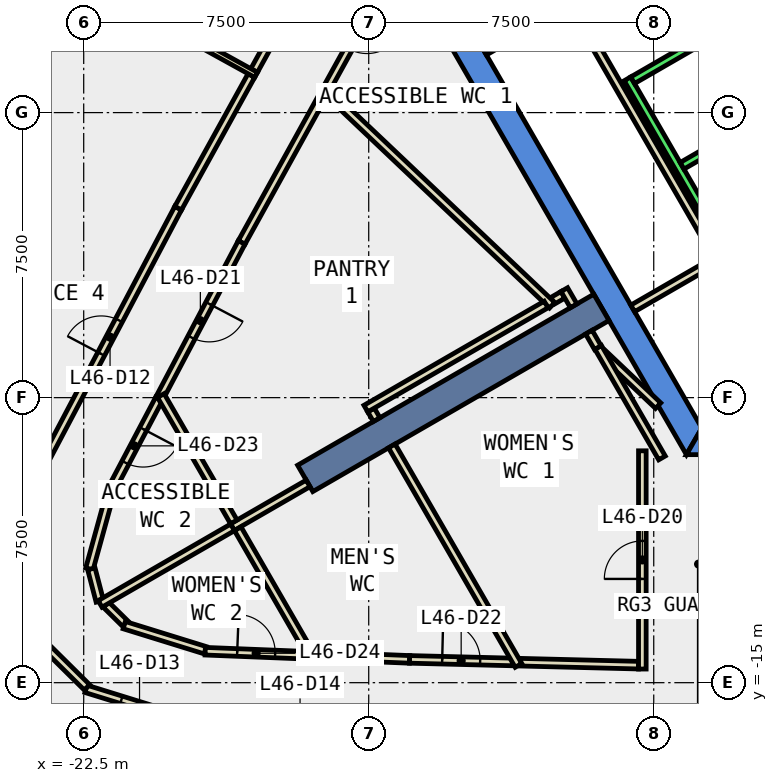
"""IFC4 building model, lengths in metres.
Left out: names, types, materials, properties, quantities, classifications, styles, units other than length and angle.
Written with IfcOpenShell. Run it as: python <this file> out.ifc"""

import sys

from ifc_helpers import new_model, si_unit, direction, frame, frame_2d, origin, place, context, subcontext, project, spatial, polyline, rectangle, outline, extrude, element, fill, save


model = new_model("IFC4")
c1 = context("Model", 3, precision=1e-05, world=origin(), true_north=direction((0.0, 1.0)))
c2 = subcontext(c1, "Body", "Model", "MODEL_VIEW")
j1 = project(units=[si_unit("LENGTHUNIT", "METRE"), si_unit("PLANEANGLEUNIT", "RADIAN")], contexts=[c1])
p1 = place(None, origin())
s1 = spatial("IfcSite", under=j1, at=p1, CompositionType="ELEMENT")
p2 = place(p1, origin())
s2 = spatial("IfcBuilding", under=s1, at=p2, CompositionType="ELEMENT")
p3 = place(p2, frame((0.0, 0.0, 206.6)))
s3 = spatial("IfcBuildingStorey", under=s2, at=p3, CompositionType="ELEMENT", Elevation=206.6)
p4 = place(p3, frame((0.0, 0.0, -0.4)))
e1 = element("IfcWall", 1, at=p4, inside=s3, PredefinedType="SHEAR", context=c2, shape_type="SweptSolid", body=[
    extrude(outline(polyline([(-13.279, 2.5), (-6.64, -9.0), (-6.235, -8.3), (-12.471, 2.5), (-13.279, 2.5)])), origin(), (0.0, 0.0, 1.0), 4.2),
])
p5 = place(p3, frame((0.0, 0.0, -0.4)))
e2 = element("IfcWall", 2, at=p5, inside=s3, PredefinedType="SHEAR", context=c2, shape_type="SweptSolid", body=[
    extrude(outline(polyline([(3.75, -9.0), (3.75, -8.3), (-6.235, -8.3), (-6.64, -9.0), (3.75, -9.0)])), origin(), (0.0, 0.0, 1.0), 4.2),
])
p6 = place(p3, frame((-8.877, -5.125, -0.4), z_axis=(0.0, 0.0, 1.0), x_axis=(-0.866017533419, -0.500013631625, 0.0)))
e3 = element("IfcWall", 3, at=p6, inside=s3, PredefinedType="SHEAR", context=c2, shape_type="SweptSolid", body=[
    extrude(rectangle(XDim=9.0, YDim=0.8, at=frame_2d((4.5, 0.0))), origin(), (0.0, 0.0, 1.0), 4.2),
])
p7 = place(p3, frame((-21.51, 7.086, 0.0), z_axis=(0.0, 0.0, 1.0), x_axis=(-0.483590905878, -0.875294142419, 0.0)))
e4 = element("IfcWall", 4, at=p7, inside=s3, PredefinedType="STANDARD", context=c2, shape_type="SweptSolid", body=[
    extrude(rectangle(XDim=7.238, YDim=0.3, at=frame_2d((3.619, 0.0))), origin(), (0.0, 0.0, 1.0), 3.8),
])
p8 = place(p7, frame((0.609, 0.0, 0.9)))
e5 = element("IfcOpeningElement", 5, at=p8, cuts=e4, PredefinedType="OPENING", context=c2, shape_type="SweptSolid", body=[
    extrude(rectangle(XDim=2.4, YDim=2.6, at=frame_2d((1.2, 1.3))), frame((0.0, 0.16, 0.0), z_axis=(0.0, -1.0, 0.0), x_axis=(1.0, 0.0, 0.0)), (0.0, 0.0, 1.0), 0.32),
])
p9 = place(p7, frame((4.228, 0.0, 0.9)))
e6 = element("IfcOpeningElement", 6, at=p9, cuts=e4, PredefinedType="OPENING", context=c2, shape_type="SweptSolid", body=[
    extrude(rectangle(XDim=2.4, YDim=2.6, at=frame_2d((1.2, 1.3))), frame((0.0, 0.16, 0.0), z_axis=(0.0, -1.0, 0.0), x_axis=(1.0, 0.0, 0.0)), (0.0, 0.0, 1.0), 0.32),
])
p10 = place(p3, frame((-14.487, 3.564, 0.0), z_axis=(0.0, 0.0, 1.0), x_axis=(-0.483555199903, -0.875313868648, 0.0)))
e7 = element("IfcWall", 7, at=p10, inside=s3, PredefinedType="PARTITIONING", context=c2, shape_type="SweptSolid", body=[
    extrude(rectangle(XDim=3.309, YDim=0.2, at=frame_2d((1.654, 0.0))), origin(), (0.0, 0.0, 1.0), 3.8),
])
p11 = place(p10, frame((1.154, 0.0, 0.0)))
e8 = element("IfcOpeningElement", 8, at=p11, cuts=e7, PredefinedType="OPENING", context=c2, shape_type="SweptSolid", body=[
    extrude(rectangle(XDim=1.0, YDim=2.1, at=frame_2d((0.5, 1.05))), frame((0.0, 0.11, 0.0), z_axis=(0.0, -1.0, 0.0), x_axis=(1.0, 0.0, 0.0)), (0.0, 0.0, 1.0), 0.22),
])
p12 = place(p3, frame((-11.009, -14.461, 0.0), z_axis=(0.0, 0.0, 1.0), x_axis=(0.999684451251, -0.025119672116, 0.0)))
e9 = element("IfcWall", 9, at=p12, inside=s3, PredefinedType="PARTITIONING", context=c2, shape_type="SweptSolid", body=[
    extrude(rectangle(XDim=3.11, YDim=0.2, at=frame_2d((1.555, 0.0))), origin(), (0.0, 0.0, 1.0), 3.8),
])
p13 = place(p3, frame((-16.184, 0.493, 0.0), z_axis=(0.0, 0.0, 1.0), x_axis=(-0.48354397003, -0.875320072344, 0.0)))
e10 = element("IfcWall", 10, at=p13, inside=s3, PredefinedType="PARTITIONING", context=c2, shape_type="SweptSolid", body=[
    extrude(rectangle(XDim=4.467, YDim=0.2, at=frame_2d((2.233, 0.0))), origin(), (0.0, 0.0, 1.0), 3.8),
])
p14 = place(p3, frame((-18.344, -3.417, 0.0), z_axis=(0.0, 0.0, 1.0), x_axis=(-0.466889669343, -0.884315575267, 0.0)))
e11 = element("IfcWall", 11, at=p14, inside=s3, PredefinedType="PARTITIONING", context=c2, shape_type="SweptSolid", body=[
    extrude(rectangle(XDim=4.654, YDim=0.2, at=frame_2d((2.327, 0.0))), origin(), (0.0, 0.0, 1.0), 3.8),
])
p15 = place(p14, frame((1.827, 0.0, 0.0)))
e12 = element("IfcOpeningElement", 12, at=p15, cuts=e11, PredefinedType="OPENING", context=c2, shape_type="SweptSolid", body=[
    extrude(rectangle(XDim=1.0, YDim=2.1, at=frame_2d((0.5, 1.05))), frame((0.0, 0.11, 0.0), z_axis=(0.0, -1.0, 0.0), x_axis=(1.0, 0.0, 0.0)), (0.0, 0.0, 1.0), 0.22),
])
p16 = place(p3, frame((-16.422, -14.287, 0.0), z_axis=(0.0, 0.0, 1.0), x_axis=(0.999201426829, -0.039956333943, 0.0)))
e13 = element("IfcWall", 13, at=p16, inside=s3, PredefinedType="PARTITIONING", context=c2, shape_type="SweptSolid", body=[
    extrude(rectangle(XDim=2.499, YDim=0.2, at=frame_2d((1.25, 0.0))), origin(), (0.0, 0.0, 1.0), 3.8),
])
p17 = place(p3, frame((-13.925, -14.387, 0.0), z_axis=(0.0, 0.0, 1.0), x_axis=(0.999685678874, -0.025070768935, 0.0)))
e14 = element("IfcWall", 14, at=p17, inside=s3, PredefinedType="PARTITIONING", context=c2, shape_type="SweptSolid", body=[
    extrude(rectangle(XDim=2.717, YDim=0.2, at=frame_2d((1.358, 0.0))), origin(), (0.0, 0.0, 1.0), 3.8),
])
p18 = place(p17, frame((0.858, 0.0, 0.0)))
e15 = element("IfcOpeningElement", 15, at=p18, cuts=e14, PredefinedType="OPENING", context=c2, shape_type="SweptSolid", body=[
    extrude(rectangle(XDim=1.0, YDim=2.1, at=frame_2d((0.5, 1.05))), frame((0.0, 0.11, 0.0), z_axis=(0.0, -1.0, 0.0), x_axis=(1.0, 0.0, 0.0)), (0.0, 0.0, 1.0), 0.22),
])
p19 = place(p3, frame((-20.517, -7.533, 0.0), z_axis=(0.0, 0.0, 1.0), x_axis=(-0.466570716246, -0.88448389852, 0.0)))
e16 = element("IfcWall", 16, at=p19, inside=s3, PredefinedType="PARTITIONING", context=c2, shape_type="SweptSolid", body=[
    extrude(rectangle(XDim=2.795, YDim=0.2, at=frame_2d((1.397, 0.0))), origin(), (0.0, 0.0, 1.0), 3.8),
])
p20 = place(p19, frame((0.897, 0.0, 0.0)))
e17 = element("IfcOpeningElement", 17, at=p20, cuts=e16, PredefinedType="OPENING", context=c2, shape_type="SweptSolid", body=[
    extrude(rectangle(XDim=1.0, YDim=2.1, at=frame_2d((0.5, 1.05))), frame((0.0, 0.11, 0.0), z_axis=(0.0, -1.0, 0.0), x_axis=(1.0, 0.0, 0.0)), (0.0, 0.0, 1.0), 0.22),
])
p21 = place(p3, frame((-21.801, -10.013, 0.0), z_axis=(0.0, 0.0, 1.0), x_axis=(-0.265584627827, -0.964087550725, 0.0)))
e18 = element("IfcWall", 18, at=p21, inside=s3, PredefinedType="PARTITIONING", context=c2, shape_type="SweptSolid", body=[
    extrude(rectangle(XDim=2.067, YDim=0.2, at=frame_2d((1.034, 0.0))), origin(), (0.0, 0.0, 1.0), 3.8),
])
p22 = place(p3, frame((-22.298, -12.006, 0.0), z_axis=(0.0, 0.0, 1.0), x_axis=(0.252647929446, -0.967558279251, 0.0)))
e19 = element("IfcWall", 19, at=p22, inside=s3, PredefinedType="PARTITIONING", context=c2, shape_type="SweptSolid", body=[
    extrude(rectangle(XDim=0.879, YDim=0.2, at=frame_2d((0.44, 0.0))), origin(), (0.0, 0.0, 1.0), 3.8),
])
p23 = place(p3, frame((-21.912, -12.948, 0.0), z_axis=(0.0, 0.0, 1.0), x_axis=(0.712089244685, -0.702088959893, 0.0)))
e20 = element("IfcWall", 20, at=p23, inside=s3, PredefinedType="PARTITIONING", context=c2, shape_type="SweptSolid", body=[
    extrude(rectangle(XDim=0.708, YDim=0.2, at=frame_2d((0.354, 0.0))), origin(), (0.0, 0.0, 1.0), 3.8),
])
p24 = place(p3, frame((-21.433, -13.486, 0.0), z_axis=(0.0, 0.0, 1.0), x_axis=(0.955241047187, -0.295828568211, 0.0)))
e21 = element("IfcWall", 21, at=p24, inside=s3, PredefinedType="PARTITIONING", context=c2, shape_type="SweptSolid", body=[
    extrude(rectangle(XDim=2.234, YDim=0.2, at=frame_2d((1.117, 0.0))), origin(), (0.0, 0.0, 1.0), 3.8),
])
p25 = place(p3, frame((-19.303, -14.172, 0.0), z_axis=(0.0, 0.0, 1.0), x_axis=(0.999205458466, -0.03985538574, 0.0)))
e22 = element("IfcWall", 22, at=p25, inside=s3, PredefinedType="PARTITIONING", context=c2, shape_type="SweptSolid", body=[
    extrude(rectangle(XDim=2.683, YDim=0.2, at=frame_2d((1.342, 0.0))), origin(), (0.0, 0.0, 1.0), 3.8),
])
p26 = place(p25, frame((0.842, 0.0, 0.0)))
e23 = element("IfcOpeningElement", 23, at=p26, cuts=e22, PredefinedType="OPENING", context=c2, shape_type="SweptSolid", body=[
    extrude(rectangle(XDim=1.0, YDim=2.1, at=frame_2d((0.5, 1.05))), frame((0.0, 0.11, 0.0), z_axis=(0.0, -1.0, 0.0), x_axis=(1.0, 0.0, 0.0)), (0.0, 0.0, 1.0), 0.22),
])
p27 = place(p3, frame((-18.015, 1.107, 0.0), z_axis=(0.0, 0.0, 1.0), x_axis=(0.483551557311, 0.875315880938, 0.0)))
e24 = element("IfcWall", 24, at=p27, inside=s3, PredefinedType="PARTITIONING", context=c2, shape_type="SweptSolid", body=[
    extrude(rectangle(XDim=3.987, YDim=0.2, at=frame_2d((1.994, 0.0))), origin(), (0.0, 0.0, 1.0), 3.8),
])
p28 = place(p3, frame((-23.598, -9.301, 0.0), z_axis=(0.0, 0.0, 1.0), x_axis=(0.466852608943, 0.884335140952, 0.0)))
e25 = element("IfcWall", 25, at=p28, inside=s3, PredefinedType="PARTITIONING", context=c2, shape_type="SweptSolid", body=[
    extrude(rectangle(XDim=7.675, YDim=0.2, at=frame_2d((3.837, 0.0))), origin(), (0.0, 0.0, 1.0), 3.8),
])
p29 = place(p28, frame((3.337, 0.0, 0.0)))
e26 = element("IfcOpeningElement", 26, at=p29, cuts=e25, PredefinedType="OPENING", context=c2, shape_type="SweptSolid", body=[
    extrude(rectangle(XDim=1.0, YDim=2.1, at=frame_2d((0.5, 1.05))), frame((0.0, 0.11, 0.0), z_axis=(0.0, -1.0, 0.0), x_axis=(1.0, 0.0, 0.0)), (0.0, 0.0, 1.0), 0.22),
])
p30 = place(p3, frame((-20.015, -2.514, 0.0), z_axis=(0.0, 0.0, 1.0), x_axis=(0.483363864601, 0.875419541933, 0.0)))
e27 = element("IfcWall", 27, at=p30, inside=s3, PredefinedType="PARTITIONING", context=c2, shape_type="SweptSolid", body=[
    extrude(rectangle(XDim=3.987, YDim=0.2, at=frame_2d((1.993, 0.0))), origin(), (0.0, 0.0, 1.0), 3.8),
])
p31 = place(p3, frame((-19.623, -16.035, 0.0), z_axis=(0.0, 0.0, 1.0), x_axis=(-0.955234616163, 0.295849333419, 0.0)))
e28 = element("IfcWall", 28, at=p31, inside=s3, PredefinedType="PARTITIONING", context=c2, shape_type="SweptSolid", body=[
    extrude(rectangle(XDim=2.947, YDim=0.2, at=frame_2d((1.473, 0.0))), origin(), (0.0, 0.0, 1.0), 3.8),
])
p32 = place(p31, frame((0.974, 0.0, 0.0)))
e29 = element("IfcOpeningElement", 29, at=p32, cuts=e28, PredefinedType="OPENING", context=c2, shape_type="SweptSolid", body=[
    extrude(rectangle(XDim=1.0, YDim=2.1, at=frame_2d((0.5, 1.05))), frame((0.0, 0.11, 0.0), z_axis=(0.0, -1.0, 0.0), x_axis=(1.0, 0.0, 0.0)), (0.0, 0.0, 1.0), 0.22),
])
p33 = place(p3, frame((-22.414, -15.123, 0.0), z_axis=(0.0, 0.0, 1.0), x_axis=(-0.710949827962, 0.703242733429, 0.0)))
e30 = element("IfcWall", 30, at=p33, inside=s3, PredefinedType="PARTITIONING", context=c2, shape_type="SweptSolid", body=[
    extrude(rectangle(XDim=2.059, YDim=0.2, at=frame_2d((1.03, 0.0))), origin(), (0.0, 0.0, 1.0), 3.8),
])
p34 = place(p3, frame((-5.888, -3.902, 0.0), z_axis=(0.0, 0.0, 1.0), x_axis=(-0.866022959057, -0.500004234368, 0.0)))
e31 = element("IfcWall", 31, at=p34, inside=s3, PredefinedType="PARTITIONING", context=c2, shape_type="SweptSolid", body=[
    extrude(rectangle(XDim=2.5, YDim=0.2, at=frame_2d((1.25, 0.0))), origin(), (0.0, 0.0, 1.0), 3.8),
])
p35 = place(p3, frame((-11.953, 1.603, 0.0), z_axis=(0.0, 0.0, 1.0), x_axis=(0.865998541277, 0.500046524342, 0.0)))
e32 = element("IfcWall", 32, at=p35, inside=s3, PredefinedType="PARTITIONING", context=c2, shape_type="SweptSolid", body=[
    extrude(rectangle(XDim=2.5, YDim=0.2, at=frame_2d((1.25, 0.0))), origin(), (0.0, 0.0, 1.0), 3.8),
])
p36 = place(p35, frame((1.5, 0.0, 0.0)))
e33 = element("IfcOpeningElement", 33, at=p36, cuts=e32, PredefinedType="OPENING", context=c2, shape_type="SweptSolid", body=[
    extrude(rectangle(XDim=0.9, YDim=2.1, at=frame_2d((0.45, 1.05))), frame((0.0, 0.11, 0.0), z_axis=(0.0, -1.0, 0.0), x_axis=(1.0, 0.0, 0.0)), (0.0, 0.0, 1.0), 0.22),
])
p37 = place(p3, frame((-9.751, 2.99, 0.0), z_axis=(0.0, 0.0, 1.0), x_axis=(0.500012163284, -0.866018381195, 0.0)))
e34 = element("IfcWall", 34, at=p37, inside=s3, PredefinedType="PARTITIONING", context=c2, shape_type="SweptSolid", body=[
    extrude(rectangle(XDim=8.0, YDim=0.2, at=frame_2d((4.0, 0.0))), origin(), (0.0, 0.0, 1.0), 3.8),
])
p38 = place(p3, frame((-8.84, -6.332, 0.0), z_axis=(0.0, 0.0, 1.0), x_axis=(0.726080635734, -0.687609562479, 0.0)))
e35 = element("IfcWall", 35, at=p38, inside=s3, PredefinedType="PARTITIONING", context=c2, shape_type="SweptSolid", body=[
    extrude(rectangle(XDim=2.005, YDim=0.2, at=frame_2d((1.003, 0.0))), origin(), (0.0, 0.0, 1.0), 3.8),
])
p39 = place(p3, frame((-7.8, -14.641, 0.0), z_axis=(0.0, 0.0, 1.0), x_axis=(0.0, 1.0, 0.0)))
e36 = element("IfcWall", 36, at=p39, inside=s3, PredefinedType="PARTITIONING", context=c2, shape_type="SweptSolid", body=[
    extrude(rectangle(XDim=5.742, YDim=0.2, at=frame_2d((2.871, 0.0))), origin(), (0.0, 0.0, 1.0), 3.8),
])
p40 = place(p39, frame((2.371, 0.0, 0.0)))
e37 = element("IfcOpeningElement", 37, at=p40, cuts=e36, PredefinedType="OPENING", context=c2, shape_type="SweptSolid", body=[
    extrude(rectangle(XDim=1.0, YDim=2.1, at=frame_2d((0.5, 1.05))), frame((0.0, 0.11, 0.0), z_axis=(0.0, -1.0, 0.0), x_axis=(1.0, 0.0, 0.0)), (0.0, 0.0, 1.0), 0.22),
])
p41 = place(p3, frame((-7.283, -9.086, 0.0), z_axis=(0.0, 0.0, 1.0), x_axis=(-0.499883958536, 0.86609238999, 0.0)))
e38 = element("IfcWall", 38, at=p41, inside=s3, PredefinedType="PARTITIONING", context=c2, shape_type="SweptSolid", body=[
    extrude(rectangle(XDim=3.359, YDim=0.2, at=frame_2d((1.679, 0.0))), origin(), (0.0, 0.0, 1.0), 3.8),
])
p42 = place(p3, frame((-8.973, -6.183, 0.0), z_axis=(0.0, 0.0, 1.0), x_axis=(-0.499557093027, 0.86628096528, 0.0)))
e39 = element("IfcWall", 39, at=p42, inside=s3, PredefinedType="PARTITIONING", context=c2, shape_type="SweptSolid", body=[
    extrude(rectangle(XDim=0.469, YDim=0.2, at=frame_2d((0.234, 0.0))), origin(), (0.0, 0.0, 1.0), 3.8),
])
p43 = place(p3, frame((-9.89, -4.795, 0.0), z_axis=(0.0, 0.0, 1.0), x_axis=(-0.866447259568, -0.499268611457, 0.0)))
e40 = element("IfcWall", 40, at=p43, inside=s3, PredefinedType="PARTITIONING", context=c2, shape_type="SweptSolid", body=[
    extrude(rectangle(XDim=0.311, YDim=0.2, at=frame_2d((0.155, 0.0))), origin(), (0.0, 0.0, 1.0), 3.8),
])
p44 = place(p3, frame((-10.173, -5.069, 0.0), z_axis=(0.0, 0.0, 1.0), x_axis=(-0.725908697087, 0.687791075468, 0.0)))
e41 = element("IfcWall", 41, at=p44, inside=s3, PredefinedType="PARTITIONING", context=c2, shape_type="SweptSolid", body=[
    extrude(rectangle(XDim=8.313, YDim=0.2, at=frame_2d((4.157, 0.0))), origin(), (0.0, 0.0, 1.0), 3.8),
])
p45 = place(p3, frame((-14.792, -8.078, 0.0), z_axis=(0.0, 0.0, 1.0), x_axis=(-0.50241736454, 0.864625231999, 0.0)))
e42 = element("IfcWall", 42, at=p45, inside=s3, PredefinedType="PARTITIONING", context=c2, shape_type="SweptSolid", body=[
    extrude(rectangle(XDim=0.292, YDim=0.2, at=frame_2d((0.146, 0.0))), origin(), (0.0, 0.0, 1.0), 3.8),
])
p46 = place(p3, frame((-15.076, -7.788, 0.0), z_axis=(0.0, 0.0, 1.0), x_axis=(0.866092814325, 0.499883223337, 0.0)))
e43 = element("IfcWall", 43, at=p46, inside=s3, PredefinedType="PARTITIONING", context=c2, shape_type="SweptSolid", body=[
    extrude(rectangle(XDim=5.477, YDim=0.2, at=frame_2d((2.739, 0.0))), origin(), (0.0, 0.0, 1.0), 3.8),
])
p47 = place(p3, frame((-11.059, -14.545, 0.0), z_axis=(0.0, 0.0, 1.0), x_axis=(-0.499935899035, 0.866062409331, 0.0)))
e44 = element("IfcWall", 44, at=p47, inside=s3, PredefinedType="PARTITIONING", context=c2, shape_type="SweptSolid", body=[
    extrude(rectangle(XDim=6.667, YDim=0.2, at=frame_2d((3.333, 0.0))), origin(), (0.0, 0.0, 1.0), 3.8),
])
p48 = place(p3, frame((-16.595, -9.757, 0.0), z_axis=(0.0, 0.0, 1.0), x_axis=(-0.866053019151, -0.499952165731, 0.0)))
e45 = element("IfcWall", 45, at=p48, inside=s3, PredefinedType="PARTITIONING", context=c2, shape_type="SweptSolid", body=[
    extrude(rectangle(XDim=2.3, YDim=0.2, at=frame_2d((1.15, 0.0))), origin(), (0.0, 0.0, 1.0), 3.8),
])
p49 = place(p3, frame((-18.55, -10.77, 0.0), z_axis=(0.0, 0.0, 1.0), x_axis=(-0.500050869834, 0.86599603208, 0.0)))
e46 = element("IfcWall", 46, at=p49, inside=s3, PredefinedType="PARTITIONING", context=c2, shape_type="SweptSolid", body=[
    extrude(rectangle(XDim=3.839, YDim=0.2, at=frame_2d((1.92, 0.0))), origin(), (0.0, 0.0, 1.0), 3.8),
])
p50 = place(p3, frame((-16.472, -14.37, 0.0), z_axis=(0.0, 0.0, 1.0), x_axis=(-0.500009715097, 0.866019794698, 0.0)))
e47 = element("IfcWall", 47, at=p50, inside=s3, PredefinedType="PARTITIONING", context=c2, shape_type="SweptSolid", body=[
    extrude(rectangle(XDim=3.948, YDim=0.2, at=frame_2d((1.974, 0.0))), origin(), (0.0, 0.0, 1.0), 3.8),
])
p51 = place(p3, frame((-18.583, -10.914, 0.0), z_axis=(0.0, 0.0, 1.0), x_axis=(-0.8659987338, -0.500046190923, 0.0)))
e48 = element("IfcWall", 48, at=p51, inside=s3, PredefinedType="PARTITIONING", context=c2, shape_type="SweptSolid", body=[
    extrude(rectangle(XDim=4.025, YDim=0.2, at=frame_2d((2.013, 0.0))), origin(), (0.0, 0.0, 1.0), 3.8),
])
p52 = place(p3, frame((-17.964, 0.993, 0.0), z_axis=(0.0, 0.0, 1.0), x_axis=(-0.875289017238, 0.483600182282, 0.0)))
e49 = element("IfcWall", 49, at=p52, inside=s3, PredefinedType="PARTITIONING", context=c2, shape_type="SweptSolid", body=[
    extrude(rectangle(XDim=5.9, YDim=0.15, at=frame_2d((2.95, 0.0))), origin(), (0.0, 0.0, 1.0), 3.8),
])
p53 = place(p3, frame((-9.607, -5.084, 0.0), z_axis=(0.0, 0.0, 1.0), x_axis=(-0.500194922027, 0.865912836248, 0.0)))
e50 = element("IfcWall", 50, at=p53, inside=s3, PredefinedType="PARTITIONING", context=c2, shape_type="SweptSolid", body=[
    extrude(rectangle(XDim=0.492, YDim=0.2, at=frame_2d((0.246, 0.0))), origin(), (0.0, 0.0, 1.0), 3.8),
])
p54 = place(p3, frame((-8.192, 0.888, 0.0), z_axis=(0.0, 0.0, 1.0), x_axis=(0.500034260056, -0.866005622828, 0.0)))
e51 = element("IfcWall", 51, at=p54, inside=s3, PredefinedType="STANDARD", context=c2, shape_type="SweptSolid", body=[
    extrude(rectangle(XDim=5.399, YDim=0.2, at=frame_2d((2.7, 0.0))), origin(), (0.0, 0.0, 1.0), 3.8),
])
for number, where, z_axis, x_axis in (
    (52, (-5.977, 2.052, 0.0), (0.0, 0.0, 1.0), (-0.866, -0.5, 0.0)),
    (53, (-4.677, -0.2, 0.0), (0.0, 0.0, 1.0), (-0.866, -0.5, 0.0)),
):
    element("IfcWall", number, at=place(p3, frame(where, z_axis=z_axis, x_axis=x_axis)), inside=s3, PredefinedType="STANDARD", context=c2, shape_type="SweptSolid", body=[
        extrude(rectangle(XDim=2.399, YDim=0.2, at=frame_2d((1.2, 0.0))), origin(), (0.0, 0.0, 1.0), 3.8),
    ])
p55 = place(p29, origin())
e54 = element("IfcDoor", 54, at=p55, inside=s3, OperationType="SINGLE_SWING_LEFT", PredefinedType="DOOR", context=c2, shape_type="SweptSolid", body=[
    extrude(rectangle(XDim=1.0, YDim=2.1, at=frame_2d((0.5, 1.05))), frame((0.0, 0.025, 0.0), z_axis=(0.0, -1.0, 0.0), x_axis=(1.0, 0.0, 0.0)), (0.0, 0.0, 1.0), 0.05),
])
fill(e26, e54)
p56 = place(p32, origin())
e55 = element("IfcDoor", 55, at=p56, inside=s3, OperationType="SINGLE_SWING_LEFT", PredefinedType="DOOR", context=c2, shape_type="SweptSolid", body=[
    extrude(rectangle(XDim=1.0, YDim=2.1, at=frame_2d((0.5, 1.05))), frame((0.0, 0.025, 0.0), z_axis=(0.0, -1.0, 0.0), x_axis=(1.0, 0.0, 0.0)), (0.0, 0.0, 1.0), 0.05),
])
fill(e29, e55)
p57 = place(p40, origin())
e56 = element("IfcDoor", 56, at=p57, inside=s3, OperationType="SINGLE_SWING_LEFT", PredefinedType="DOOR", context=c2, shape_type="SweptSolid", body=[
    extrude(rectangle(XDim=1.0, YDim=2.1, at=frame_2d((0.5, 1.05))), frame((0.0, 0.025, 0.0), z_axis=(0.0, -1.0, 0.0), x_axis=(1.0, 0.0, 0.0)), (0.0, 0.0, 1.0), 0.05),
])
fill(e37, e56)
p58 = place(p15, origin())
e57 = element("IfcDoor", 57, at=p58, inside=s3, OperationType="SINGLE_SWING_LEFT", PredefinedType="DOOR", context=c2, shape_type="SweptSolid", body=[
    extrude(rectangle(XDim=1.0, YDim=2.1, at=frame_2d((0.5, 1.05))), frame((0.0, 0.025, 0.0), z_axis=(0.0, -1.0, 0.0), x_axis=(1.0, 0.0, 0.0)), (0.0, 0.0, 1.0), 0.05),
])
fill(e12, e57)
p59 = place(p18, origin())
e58 = element("IfcDoor", 58, at=p59, inside=s3, OperationType="SINGLE_SWING_LEFT", PredefinedType="DOOR", context=c2, shape_type="SweptSolid", body=[
    extrude(rectangle(XDim=1.0, YDim=2.1, at=frame_2d((0.5, 1.05))), frame((0.0, 0.025, 0.0), z_axis=(0.0, -1.0, 0.0), x_axis=(1.0, 0.0, 0.0)), (0.0, 0.0, 1.0), 0.05),
])
fill(e15, e58)
p60 = place(p20, origin())
e59 = element("IfcDoor", 59, at=p60, inside=s3, OperationType="SINGLE_SWING_LEFT", PredefinedType="DOOR", context=c2, shape_type="SweptSolid", body=[
    extrude(rectangle(XDim=1.0, YDim=2.1, at=frame_2d((0.5, 1.05))), frame((0.0, 0.025, 0.0), z_axis=(0.0, -1.0, 0.0), x_axis=(1.0, 0.0, 0.0)), (0.0, 0.0, 1.0), 0.05),
])
fill(e17, e59)
p61 = place(p26, origin())
e60 = element("IfcDoor", 60, at=p61, inside=s3, OperationType="SINGLE_SWING_LEFT", PredefinedType="DOOR", context=c2, shape_type="SweptSolid", body=[
    extrude(rectangle(XDim=1.0, YDim=2.1, at=frame_2d((0.5, 1.05))), frame((0.0, 0.025, 0.0), z_axis=(0.0, -1.0, 0.0), x_axis=(1.0, 0.0, 0.0)), (0.0, 0.0, 1.0), 0.05),
])
fill(e23, e60)
save(model, sys.argv[1])
